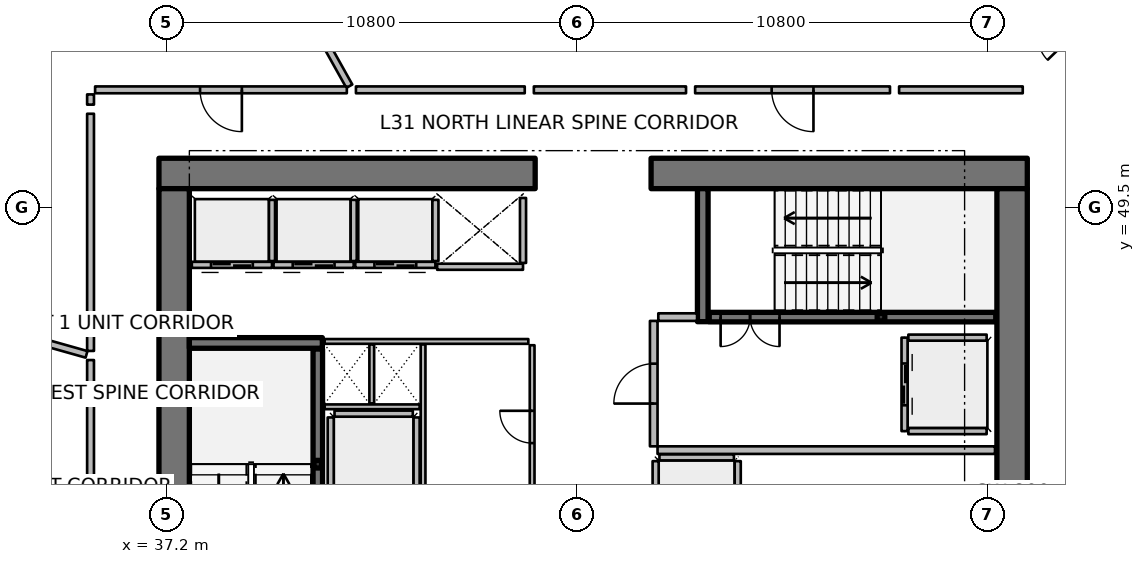
"""IFC4 building model, lengths in metres.
Left out: names, types, materials, properties, quantities, classifications, styles, units other than length and angle.
Written with IfcOpenShell. Run it as: python <this file> out.ifc"""

import sys

from ifc_helpers import new_model, si_unit, direction, frame, frame_2d, origin, origin_2d, place, context, subcontext, project, spatial, rectangle, hollow_rectangle, extrude, element, fill, save


model = new_model("IFC4")
c1 = context("Model", 3, precision=1e-05, world=origin(), true_north=direction((0.0, 1.0)))
c2 = subcontext(c1, "Body", "Model", "MODEL_VIEW")
j1 = project(units=[si_unit("LENGTHUNIT", "METRE"), si_unit("PLANEANGLEUNIT", "RADIAN")], contexts=[c1])
p1 = place(None, origin())
s1 = spatial("IfcSite", under=j1, at=p1, CompositionType="ELEMENT")
p2 = place(p1, origin())
s2 = spatial("IfcBuilding", under=s1, at=p2, CompositionType="ELEMENT")
p3 = place(p2, frame((0.0, 0.0, 127.8)))
s3 = spatial("IfcBuildingStorey", under=s2, at=p3, CompositionType="ELEMENT", Elevation=127.8)
p4 = place(p3, frame((37.0, 50.4, 0.0), z_axis=(0.0, 0.0, 1.0), x_axis=(1.0, 0.0, 0.0)))
e1 = element("IfcWall", 1, at=p4, inside=s3, PredefinedType="SHEAR", context=c2, shape_type="SweptSolid", body=[
    extrude(rectangle(XDim=9.9, YDim=0.8, at=frame_2d((4.95, 0.0))), origin(), (0.0, 0.0, 1.0), 3.75),
])
p5 = place(p3, frame((49.95, 50.4, 0.0), z_axis=(0.0, 0.0, 1.0), x_axis=(1.0, 0.0, 0.0)))
e2 = element("IfcWall", 2, at=p5, inside=s3, PredefinedType="SHEAR", context=c2, shape_type="SweptSolid", body=[
    extrude(rectangle(XDim=9.9, YDim=0.8, at=frame_2d((4.95, 0.0))), origin(), (0.0, 0.0, 1.0), 3.75),
])
for number, where, z_axis, x_axis in (
    (3, (37.4, 34.0, 0.0), (0.0, 0.0, 1.0), (0.0, 1.0, 0.0)),
    (4, (59.45, 34.0, 0.0), (0.0, 0.0, 1.0), (0.0, 1.0, 0.0)),
):
    element("IfcWall", number, at=place(p3, frame(where, z_axis=z_axis, x_axis=x_axis)), inside=s3, PredefinedType="SHEAR", context=c2, shape_type="SweptSolid", body=[
        extrude(rectangle(XDim=16.0, YDim=0.8, at=frame_2d((8.0, 0.0))), origin(), (0.0, 0.0, 1.0), 3.75),
    ])
for number, where, z_axis, x_axis in (
    (5, (37.8, 45.94, 0.0), (0.0, 0.0, 1.0), (1.0, 0.0, 0.0)),
    (6, (51.31, 46.5, 0.0), (0.0, 0.0, 1.0), (0.0, 1.0, 0.0)),
):
    element("IfcWall", number, at=place(p3, frame(where, z_axis=z_axis, x_axis=x_axis)), inside=s3, PredefinedType="SHEAR", context=c2, shape_type="SweptSolid", body=[
        extrude(rectangle(XDim=3.5, YDim=0.28, at=frame_2d((1.75, 0.0))), origin(), (0.0, 0.0, 1.0), 3.75),
    ])
for number, where, z_axis, x_axis in (
    (7, (41.18, 42.75, 0.0), (0.0, 0.0, 1.0), (1.0, 0.0, 0.0)),
    (8, (56.0, 46.62, 0.0), (0.0, 0.0, 1.0), (1.0, 0.0, 0.0)),
):
    element("IfcColumn", number, at=place(p3, frame(where, z_axis=z_axis, x_axis=x_axis)), inside=s3, PredefinedType="COLUMN", context=c2, shape_type="SweptSolid", body=[
        extrude(hollow_rectangle(XDim=0.2, YDim=0.2, WallThickness=0.01, InnerFilletRadius=0.01, OuterFilletRadius=0.02, at=origin_2d()), origin(), (0.0, 0.0, 1.0), 1.67),
    ])
p6 = place(p3, frame((41.18, 38.22, 0.0), z_axis=(0.0, 0.0, 1.0), x_axis=(0.0, 1.0, 0.0)))
e9 = element("IfcWall", 9, at=p6, inside=s3, PredefinedType="SOLIDWALL", context=c2, shape_type="SweptSolid", body=[
    extrude(rectangle(XDim=7.56, YDim=0.25, at=frame_2d((3.78, 0.0))), origin(), (0.0, 0.0, 1.0), 3.5),
])
p7 = place(p6, frame((0.3, 0.0, 0.0)))
e10 = element("IfcOpeningElement", 10, at=p7, cuts=e9, PredefinedType="OPENING", context=c2, shape_type="SweptSolid", body=[
    extrude(rectangle(XDim=1.55, YDim=2.15, at=frame_2d((0.775, 1.075))), frame((0.0, 0.135, 0.0), z_axis=(0.0, -1.0, 0.0), x_axis=(1.0, 0.0, 0.0)), (0.0, 0.0, 1.0), 0.27),
])
p8 = place(p3, frame((51.48, 46.62, 0.0), z_axis=(0.0, 0.0, 1.0), x_axis=(1.0, 0.0, 0.0)))
e11 = element("IfcWall", 11, at=p8, inside=s3, PredefinedType="SOLIDWALL", context=c2, shape_type="SweptSolid", body=[
    extrude(rectangle(XDim=7.54, YDim=0.25, at=frame_2d((3.77, 0.0))), origin(), (0.0, 0.0, 1.0), 3.5),
])
p9 = place(p8, frame((0.3, 0.0, 0.0)))
e12 = element("IfcOpeningElement", 12, at=p9, cuts=e11, PredefinedType="OPENING", context=c2, shape_type="SweptSolid", body=[
    extrude(rectangle(XDim=1.55, YDim=2.15, at=frame_2d((0.775, 1.075))), frame((0.0, 0.135, 0.0), z_axis=(0.0, -1.0, 0.0), x_axis=(1.0, 0.0, 0.0)), (0.0, 0.0, 1.0), 0.27),
])
p10 = place(p3, frame((39.975, 47.995, 0.0), z_axis=(0.0, 0.0, 1.0), x_axis=(-1.0, 0.0, 0.0)))
e13 = element("IfcWall", 13, at=p10, inside=s3, PredefinedType="PARTITIONING", context=c2, shape_type="SweptSolid", body=[
    extrude(rectangle(XDim=2.11, YDim=0.16, at=frame_2d((1.055, 0.0))), origin(), (0.0, 0.0, 1.0), 3.5),
])
p11 = place(p10, frame((0.505, 0.0, 0.0)))
e14 = element("IfcOpeningElement", 14, at=p11, cuts=e13, PredefinedType="OPENING", context=c2, shape_type="SweptSolid", body=[
    extrude(rectangle(XDim=1.1, YDim=2.1, at=frame_2d((0.55, 1.05))), frame((0.0, 0.09, 0.0), z_axis=(0.0, -1.0, 0.0), x_axis=(1.0, 0.0, 0.0)), (0.0, 0.0, 1.0), 0.18),
])
p12 = place(p3, frame((39.975, 48.095, 0.0), z_axis=(0.0, 0.0, 1.0), x_axis=(0.0, 1.0, 0.0)))
e15 = element("IfcWall", 15, at=p12, inside=s3, PredefinedType="PARTITIONING", context=c2, shape_type="SweptSolid", body=[
    extrude(rectangle(XDim=1.61, YDim=0.16, at=frame_2d((0.805, 0.0))), origin(), (0.0, 0.0, 1.0), 3.5),
])
p13 = place(p3, frame((42.125, 47.995, 0.0), z_axis=(0.0, 0.0, 1.0), x_axis=(-1.0, 0.0, 0.0)))
e16 = element("IfcWall", 16, at=p13, inside=s3, PredefinedType="PARTITIONING", context=c2, shape_type="SweptSolid", body=[
    extrude(rectangle(XDim=2.11, YDim=0.16, at=frame_2d((1.055, 0.0))), origin(), (0.0, 0.0, 1.0), 3.5),
])
p14 = place(p13, frame((0.505, 0.0, 0.0)))
e17 = element("IfcOpeningElement", 17, at=p14, cuts=e16, PredefinedType="OPENING", context=c2, shape_type="SweptSolid", body=[
    extrude(rectangle(XDim=1.1, YDim=2.1, at=frame_2d((0.55, 1.05))), frame((0.0, 0.09, 0.0), z_axis=(0.0, -1.0, 0.0), x_axis=(1.0, 0.0, 0.0)), (0.0, 0.0, 1.0), 0.18),
])
p15 = place(p3, frame((42.125, 48.095, 0.0), z_axis=(0.0, 0.0, 1.0), x_axis=(0.0, 1.0, 0.0)))
e18 = element("IfcWall", 18, at=p15, inside=s3, PredefinedType="PARTITIONING", context=c2, shape_type="SweptSolid", body=[
    extrude(rectangle(XDim=1.61, YDim=0.16, at=frame_2d((0.805, 0.0))), origin(), (0.0, 0.0, 1.0), 3.5),
])
p16 = place(p3, frame((44.275, 47.995, 0.0), z_axis=(0.0, 0.0, 1.0), x_axis=(-1.0, 0.0, 0.0)))
e19 = element("IfcWall", 19, at=p16, inside=s3, PredefinedType="PARTITIONING", context=c2, shape_type="SweptSolid", body=[
    extrude(rectangle(XDim=2.11, YDim=0.16, at=frame_2d((1.055, 0.0))), origin(), (0.0, 0.0, 1.0), 3.5),
])
p17 = place(p16, frame((0.505, 0.0, 0.0)))
e20 = element("IfcOpeningElement", 20, at=p17, cuts=e19, PredefinedType="OPENING", context=c2, shape_type="SweptSolid", body=[
    extrude(rectangle(XDim=1.1, YDim=2.1, at=frame_2d((0.55, 1.05))), frame((0.0, 0.09, 0.0), z_axis=(0.0, -1.0, 0.0), x_axis=(1.0, 0.0, 0.0)), (0.0, 0.0, 1.0), 0.18),
])
p18 = place(p3, frame((44.275, 48.095, 0.0), z_axis=(0.0, 0.0, 1.0), x_axis=(0.0, 1.0, 0.0)))
e21 = element("IfcWall", 21, at=p18, inside=s3, PredefinedType="PARTITIONING", context=c2, shape_type="SweptSolid", body=[
    extrude(rectangle(XDim=1.61, YDim=0.16, at=frame_2d((0.805, 0.0))), origin(), (0.0, 0.0, 1.0), 3.5),
])
p19 = place(p3, frame((46.58, 47.945, 0.0), z_axis=(0.0, 0.0, 1.0), x_axis=(-1.0, 0.0, 0.0)))
e22 = element("IfcWall", 22, at=p19, inside=s3, PredefinedType="PARTITIONING", context=c2, shape_type="SweptSolid", body=[
    extrude(rectangle(XDim=2.26, YDim=0.16, at=frame_2d((1.13, 0.0))), origin(), (0.0, 0.0, 1.0), 3.5),
])
p20 = place(p3, frame((46.58, 48.045, 0.0), z_axis=(0.0, 0.0, 1.0), x_axis=(0.0, 1.0, 0.0)))
e23 = element("IfcWall", 23, at=p20, inside=s3, PredefinedType="PARTITIONING", context=c2, shape_type="SweptSolid", body=[
    extrude(rectangle(XDim=1.71, YDim=0.16, at=frame_2d((0.855, 0.0))), origin(), (0.0, 0.0, 1.0), 3.5),
])
for number, where, z_axis, x_axis in (
    (24, (43.78, 41.72, 0.0), (0.0, 0.0, 1.0), (0.0, 1.0, 0.0)),
    (25, (41.52, 41.72, 0.0), (0.0, 0.0, 1.0), (0.0, 1.0, 0.0)),
):
    element("IfcWall", number, at=place(p3, frame(where, z_axis=z_axis, x_axis=x_axis)), inside=s3, PredefinedType="PARTITIONING", context=c2, shape_type="SweptSolid", body=[
        extrude(rectangle(XDim=2.26, YDim=0.16, at=frame_2d((1.13, 0.0))), origin(), (0.0, 0.0, 1.0), 3.5),
    ])
p21 = place(p3, frame((41.62, 44.08, 0.0), z_axis=(0.0, 0.0, 1.0), x_axis=(1.0, 0.0, 0.0)))
e26 = element("IfcWall", 26, at=p21, inside=s3, PredefinedType="PARTITIONING", context=c2, shape_type="SweptSolid", body=[
    extrude(rectangle(XDim=2.06, YDim=0.16, at=frame_2d((1.03, 0.0))), origin(), (0.0, 0.0, 1.0), 3.5),
])
p22 = place(p3, frame((56.62, 46.08, 0.0), z_axis=(0.0, 0.0, 1.0), x_axis=(0.0, -1.0, 0.0)))
e27 = element("IfcWall", 27, at=p22, inside=s3, PredefinedType="PARTITIONING", context=c2, shape_type="SweptSolid", body=[
    extrude(rectangle(XDim=2.46, YDim=0.16, at=frame_2d((1.23, 0.0))), origin(), (0.0, 0.0, 1.0), 3.5),
])
p23 = place(p22, frame((0.68, 0.0, 0.0)))
e28 = element("IfcOpeningElement", 28, at=p23, cuts=e27, PredefinedType="OPENING", context=c2, shape_type="SweptSolid", body=[
    extrude(rectangle(XDim=1.1, YDim=2.1, at=frame_2d((0.55, 1.05))), frame((0.0, 0.09, 0.0), z_axis=(0.0, -1.0, 0.0), x_axis=(1.0, 0.0, 0.0)), (0.0, 0.0, 1.0), 0.18),
])
for number, where, z_axis, x_axis in (
    (29, (56.72, 46.08, 0.0), (0.0, 0.0, 1.0), (1.0, 0.0, 0.0)),
    (30, (56.72, 43.62, 0.0), (0.0, 0.0, 1.0), (1.0, 0.0, 0.0)),
):
    element("IfcWall", number, at=place(p3, frame(where, z_axis=z_axis, x_axis=x_axis)), inside=s3, PredefinedType="PARTITIONING", context=c2, shape_type="SweptSolid", body=[
        extrude(rectangle(XDim=2.06, YDim=0.16, at=frame_2d((1.03, 0.0))), origin(), (0.0, 0.0, 1.0), 3.5),
    ])
for number, where, z_axis, x_axis in (
    (31, (52.23, 40.67, 0.0), (0.0, 0.0, 1.0), (0.0, 1.0, 0.0)),
    (32, (50.07, 40.67, 0.0), (0.0, 0.0, 1.0), (0.0, 1.0, 0.0)),
):
    element("IfcWall", number, at=place(p3, frame(where, z_axis=z_axis, x_axis=x_axis)), inside=s3, PredefinedType="PARTITIONING", context=c2, shape_type="SweptSolid", body=[
        extrude(rectangle(XDim=2.16, YDim=0.16, at=frame_2d((1.08, 0.0))), origin(), (0.0, 0.0, 1.0), 3.5),
    ])
p24 = place(p3, frame((50.17, 42.93, 0.0), z_axis=(0.0, 0.0, 1.0), x_axis=(1.0, 0.0, 0.0)))
e33 = element("IfcWall", 33, at=p24, inside=s3, PredefinedType="PARTITIONING", context=c2, shape_type="SweptSolid", body=[
    extrude(rectangle(XDim=1.96, YDim=0.16, at=frame_2d((0.98, 0.0))), origin(), (0.0, 0.0, 1.0), 3.5),
])
p25 = place(p3, frame((50.12, 43.12, 0.0), z_axis=(0.0, 0.0, 1.0), x_axis=(1.0, 0.0, 0.0)))
e34 = element("IfcWall", 34, at=p25, inside=s3, PredefinedType="PARTITIONING", context=c2, shape_type="SweptSolid", body=[
    extrude(rectangle(XDim=8.88, YDim=0.2, at=frame_2d((4.44, 0.0))), origin(), (0.0, 0.0, 1.0), 3.5),
])
p26 = place(p3, frame((50.14, 46.62, 0.0), z_axis=(0.0, 0.0, 1.0), x_axis=(1.0, 0.0, 0.0)))
e35 = element("IfcWall", 35, at=p26, inside=s3, PredefinedType="PARTITIONING", context=c2, shape_type="SweptSolid", body=[
    extrude(rectangle(XDim=1.02, YDim=0.2, at=frame_2d((0.51, 0.0))), origin(), (0.0, 0.0, 1.0), 3.5),
])
p27 = place(p3, frame((50.02, 43.22, 0.0), z_axis=(0.0, 0.0, 1.0), x_axis=(0.0, 1.0, 0.0)))
e36 = element("IfcWall", 36, at=p27, inside=s3, PredefinedType="PARTITIONING", context=c2, shape_type="SweptSolid", body=[
    extrude(rectangle(XDim=3.3, YDim=0.2, at=frame_2d((1.65, 0.0))), origin(), (0.0, 0.0, 1.0), 3.5),
])
p28 = place(p27, frame((1.125, 0.0, 0.0)))
e37 = element("IfcOpeningElement", 37, at=p28, cuts=e36, PredefinedType="OPENING", context=c2, shape_type="SweptSolid", body=[
    extrude(rectangle(XDim=1.05, YDim=2.1, at=frame_2d((0.525, 1.05))), frame((0.0, 0.11, 0.0), z_axis=(0.0, -1.0, 0.0), x_axis=(1.0, 0.0, 0.0)), (0.0, 0.0, 1.0), 0.22),
])
p29 = place(p3, frame((41.36, 45.98, 0.0), z_axis=(0.0, 0.0, 1.0), x_axis=(1.0, 0.0, 0.0)))
e38 = element("IfcWall", 38, at=p29, inside=s3, PredefinedType="PARTITIONING", context=c2, shape_type="SweptSolid", body=[
    extrude(rectangle(XDim=5.36, YDim=0.125, at=frame_2d((2.68, 0.0))), origin(), (0.0, 0.0, 1.0), 2.94),
])
p30 = place(p3, frame((41.36, 44.26, 0.0), z_axis=(0.0, 0.0, 1.0), x_axis=(1.0, 0.0, 0.0)))
e39 = element("IfcWall", 39, at=p30, inside=s3, PredefinedType="PARTITIONING", context=c2, shape_type="SweptSolid", body=[
    extrude(rectangle(XDim=2.5, YDim=0.125, at=frame_2d((1.25, 0.0))), origin(), (0.0, 0.0, 1.0), 2.94),
])
p31 = place(p3, frame((42.6, 44.35, 0.0), z_axis=(0.0, 0.0, 1.0), x_axis=(0.0, 1.0, 0.0)))
e40 = element("IfcWall", 40, at=p31, inside=s3, PredefinedType="PARTITIONING", context=c2, shape_type="SweptSolid", body=[
    extrude(rectangle(XDim=1.55, YDim=0.125, at=frame_2d((0.775, 0.0))), origin(), (0.0, 0.0, 1.0), 2.94),
])
p32 = place(p3, frame((43.95, 41.58, 0.0), z_axis=(0.0, 0.0, 1.0), x_axis=(0.0, 1.0, 0.0)))
e41 = element("IfcWall", 41, at=p32, inside=s3, PredefinedType="PARTITIONING", context=c2, shape_type="SweptSolid", body=[
    extrude(rectangle(XDim=4.32, YDim=0.125, at=frame_2d((2.16, 0.0))), origin(), (0.0, 0.0, 1.0), 2.94),
])
p33 = place(p3, frame((46.82, 41.58, 0.0), z_axis=(0.0, 0.0, 1.0), x_axis=(0.0, 1.0, 0.0)))
e42 = element("IfcWall", 42, at=p33, inside=s3, PredefinedType="PARTITIONING", context=c2, shape_type="SweptSolid", body=[
    extrude(rectangle(XDim=4.3, YDim=0.125, at=frame_2d((2.15, 0.0))), origin(), (0.0, 0.0, 1.0), 2.94),
])
p34 = place(p33, frame((1.725, 0.0, 0.0)))
e43 = element("IfcOpeningElement", 43, at=p34, cuts=e42, PredefinedType="OPENING", context=c2, shape_type="SweptSolid", body=[
    extrude(rectangle(XDim=0.85, YDim=2.06, at=frame_2d((0.425, 1.03))), frame((0.0, 0.073, 0.0), z_axis=(0.0, -1.0, 0.0), x_axis=(1.0, 0.0, 0.0)), (0.0, 0.0, 1.0), 0.145),
])
p35 = place(p3, frame((42.01, 52.696, 0.0), z_axis=(0.0, 0.0, 1.0), x_axis=(-0.488637104979, 0.872487122906, 0.0)))
e44 = element("IfcWall", 44, at=p35, inside=s3, PredefinedType="PARTITIONING", context=c2, shape_type="SweptSolid", body=[
    extrude(rectangle(XDim=9.476, YDim=0.18, at=frame_2d((4.738, 0.0))), origin(), (0.0, 0.0, 1.0), 2.94),
])
p36 = place(p3, frame((35.094, 45.64, 0.0), z_axis=(0.0, 0.0, 1.0), x_axis=(-0.962457696796, 0.271431725996, 0.0)))
e45 = element("IfcWall", 45, at=p36, inside=s3, PredefinedType="PARTITIONING", context=c2, shape_type="SweptSolid", body=[
    extrude(rectangle(XDim=12.642, YDim=0.18, at=frame_2d((6.321, 0.0))), origin(), (0.0, 0.0, 1.0), 2.94),
])
p37 = place(p3, frame((41.944, 52.6, 0.0), z_axis=(0.0, 0.0, 1.0), x_axis=(-1.0, 0.0, 0.0)))
e46 = element("IfcWall", 46, at=p37, inside=s3, PredefinedType="PARTITIONING", context=c2, shape_type="SweptSolid", body=[
    extrude(rectangle(XDim=6.624, YDim=0.18, at=frame_2d((3.312, 0.0))), origin(), (0.0, 0.0, 1.0), 2.94),
])
p38 = place(p37, frame((2.762, 0.0, 0.0)))
e47 = element("IfcOpeningElement", 47, at=p38, cuts=e46, PredefinedType="OPENING", context=c2, shape_type="SweptSolid", body=[
    extrude(rectangle(XDim=1.1, YDim=2.1, at=frame_2d((0.55, 1.05))), frame((0.0, 0.1, 0.0), z_axis=(0.0, -1.0, 0.0), x_axis=(1.0, 0.0, 0.0)), (0.0, 0.0, 1.0), 0.2),
])
p39 = place(p3, frame((35.2, 52.48, 0.0), z_axis=(0.0, 0.0, 1.0), x_axis=(0.0, -1.0, 0.0)))
e48 = element("IfcWall", 48, at=p39, inside=s3, PredefinedType="PARTITIONING", context=c2, shape_type="SweptSolid", body=[
    extrude(rectangle(XDim=0.269, YDim=0.18, at=frame_2d((0.135, 0.0))), origin(), (0.0, 0.0, 1.0), 2.94),
])
p40 = place(p3, frame((35.2, 51.971, 0.0), z_axis=(0.0, 0.0, 1.0), x_axis=(0.0, -1.0, 0.0)))
e49 = element("IfcWall", 49, at=p40, inside=s3, PredefinedType="PARTITIONING", context=c2, shape_type="SweptSolid", body=[
    extrude(rectangle(XDim=6.241, YDim=0.18, at=frame_2d((3.12, 0.0))), origin(), (0.0, 0.0, 1.0), 2.94),
])
p41 = place(p3, frame((35.2, 45.49, 0.0), z_axis=(0.0, 0.0, 1.0), x_axis=(0.0, -1.0, 0.0)))
e50 = element("IfcWall", 50, at=p41, inside=s3, PredefinedType="PARTITIONING", context=c2, shape_type="SweptSolid", body=[
    extrude(rectangle(XDim=4.885, YDim=0.18, at=frame_2d((2.442, 0.0))), origin(), (0.0, 0.0, 1.0), 2.94),
])
p42 = place(p3, frame((56.236, 52.6, 0.0), z_axis=(0.0, 0.0, 1.0), x_axis=(-1.0, 0.0, 0.0)))
e51 = element("IfcWall", 51, at=p42, inside=s3, PredefinedType="PARTITIONING", context=c2, shape_type="SweptSolid", body=[
    extrude(rectangle(XDim=5.127, YDim=0.18, at=frame_2d((2.563, 0.0))), origin(), (0.0, 0.0, 1.0), 2.94),
])
p43 = place(p42, frame((2.013, 0.0, 0.0)))
e52 = element("IfcOpeningElement", 52, at=p43, cuts=e51, PredefinedType="OPENING", context=c2, shape_type="SweptSolid", body=[
    extrude(rectangle(XDim=1.1, YDim=2.1, at=frame_2d((0.55, 1.05))), frame((0.0, 0.1, 0.0), z_axis=(0.0, -1.0, 0.0), x_axis=(1.0, 0.0, 0.0)), (0.0, 0.0, 1.0), 0.2),
])
p44 = place(p3, frame((59.73, 52.6, 0.0), z_axis=(0.0, 0.0, 1.0), x_axis=(-1.0, 0.0, 0.0)))
e53 = element("IfcWall", 53, at=p44, inside=s3, PredefinedType="PARTITIONING", context=c2, shape_type="SweptSolid", body=[
    extrude(rectangle(XDim=3.254, YDim=0.18, at=frame_2d((1.627, 0.0))), origin(), (0.0, 0.0, 1.0), 2.94),
])
p45 = place(p3, frame((62.293, 52.708, 0.0), z_axis=(0.0, 0.0, 1.0), x_axis=(-0.696779354898, 0.717285529331, 0.0)))
e54 = element("IfcWall", 54, at=p45, inside=s3, PredefinedType="PARTITIONING", context=c2, shape_type="SweptSolid", body=[
    extrude(rectangle(XDim=4.536, YDim=0.125, at=frame_2d((2.268, 0.0))), origin(), (0.0, 0.0, 1.0), 2.94),
])
p46 = place(p45, frame((1.818, 0.0, 0.0)))
e55 = element("IfcOpeningElement", 55, at=p46, cuts=e54, PredefinedType="OPENING", context=c2, shape_type="SweptSolid", body=[
    extrude(rectangle(XDim=0.9, YDim=2.08, at=frame_2d((0.45, 1.04))), frame((0.0, 0.073, 0.0), z_axis=(0.0, -1.0, 0.0), x_axis=(1.0, 0.0, 0.0)), (0.0, 0.0, 1.0), 0.145),
])
p47 = place(p3, frame((50.869, 52.6, 0.0), z_axis=(0.0, 0.0, 1.0), x_axis=(-1.0, 0.0, 0.0)))
e56 = element("IfcWall", 56, at=p47, inside=s3, PredefinedType="PARTITIONING", context=c2, shape_type="SweptSolid", body=[
    extrude(rectangle(XDim=4.004, YDim=0.18, at=frame_2d((2.002, 0.0))), origin(), (0.0, 0.0, 1.0), 2.94),
])
p48 = place(p3, frame((46.625, 52.6, 0.0), z_axis=(0.0, 0.0, 1.0), x_axis=(-1.0, 0.0, 0.0)))
e57 = element("IfcWall", 57, at=p48, inside=s3, PredefinedType="PARTITIONING", context=c2, shape_type="SweptSolid", body=[
    extrude(rectangle(XDim=4.442, YDim=0.18, at=frame_2d((2.221, 0.0))), origin(), (0.0, 0.0, 1.0), 2.94),
])
p49 = place(p9, origin())
e58 = element("IfcDoor", 58, at=p49, inside=s3, OperationType="DOUBLE_DOOR_SINGLE_SWING", PredefinedType="DOOR", context=c2, shape_type="SweptSolid", body=[
    extrude(rectangle(XDim=1.55, YDim=2.15, at=frame_2d((0.775, 1.075))), frame((0.0, 0.025, 0.0), z_axis=(0.0, -1.0, 0.0), x_axis=(1.0, 0.0, 0.0)), (0.0, 0.0, 1.0), 0.05),
])
fill(e12, e58)
p50 = place(p11, origin())
e59 = element("IfcDoor", 59, at=p50, inside=s3, OperationType="DOUBLE_DOOR_SLIDING", PredefinedType="DOOR", context=c2, shape_type="SweptSolid", body=[
    extrude(rectangle(XDim=1.1, YDim=2.1, at=frame_2d((0.55, 1.05))), frame((0.0, 0.025, 0.0), z_axis=(0.0, -1.0, 0.0), x_axis=(1.0, 0.0, 0.0)), (0.0, 0.0, 1.0), 0.05),
])
fill(e14, e59)
p51 = place(p14, origin())
e60 = element("IfcDoor", 60, at=p51, inside=s3, OperationType="DOUBLE_DOOR_SLIDING", PredefinedType="DOOR", context=c2, shape_type="SweptSolid", body=[
    extrude(rectangle(XDim=1.1, YDim=2.1, at=frame_2d((0.55, 1.05))), frame((0.0, 0.025, 0.0), z_axis=(0.0, -1.0, 0.0), x_axis=(1.0, 0.0, 0.0)), (0.0, 0.0, 1.0), 0.05),
])
fill(e17, e60)
p52 = place(p17, origin())
e61 = element("IfcDoor", 61, at=p52, inside=s3, OperationType="DOUBLE_DOOR_SLIDING", PredefinedType="DOOR", context=c2, shape_type="SweptSolid", body=[
    extrude(rectangle(XDim=1.1, YDim=2.1, at=frame_2d((0.55, 1.05))), frame((0.0, 0.025, 0.0), z_axis=(0.0, -1.0, 0.0), x_axis=(1.0, 0.0, 0.0)), (0.0, 0.0, 1.0), 0.05),
])
fill(e20, e61)
p53 = place(p23, origin())
e62 = element("IfcDoor", 62, at=p53, inside=s3, OperationType="DOUBLE_DOOR_SLIDING", PredefinedType="DOOR", context=c2, shape_type="SweptSolid", body=[
    extrude(rectangle(XDim=1.1, YDim=2.1, at=frame_2d((0.55, 1.05))), frame((0.0, 0.025, 0.0), z_axis=(0.0, -1.0, 0.0), x_axis=(1.0, 0.0, 0.0)), (0.0, 0.0, 1.0), 0.05),
])
fill(e28, e62)
p54 = place(p28, origin())
e63 = element("IfcDoor", 63, at=p54, inside=s3, OperationType="SINGLE_SWING_LEFT", PredefinedType="DOOR", context=c2, shape_type="SweptSolid", body=[
    extrude(rectangle(XDim=1.05, YDim=2.1, at=frame_2d((0.525, 1.05))), frame((0.0, 0.025, 0.0), z_axis=(0.0, -1.0, 0.0), x_axis=(1.0, 0.0, 0.0)), (0.0, 0.0, 1.0), 0.05),
])
fill(e37, e63)
p55 = place(p34, origin())
e64 = element("IfcDoor", 64, at=p55, inside=s3, OperationType="SINGLE_SWING_RIGHT", PredefinedType="DOOR", context=c2, shape_type="SweptSolid", body=[
    extrude(rectangle(XDim=0.85, YDim=2.06, at=frame_2d((0.425, 1.03))), frame((0.0, 0.025, 0.0), z_axis=(0.0, -1.0, 0.0), x_axis=(1.0, 0.0, 0.0)), (0.0, 0.0, 1.0), 0.05),
])
fill(e43, e64)
p56 = place(p38, origin())
e65 = element("IfcDoor", 65, at=p56, inside=s3, OperationType="SINGLE_SWING_LEFT", PredefinedType="DOOR", context=c2, shape_type="SweptSolid", body=[
    extrude(rectangle(XDim=1.1, YDim=2.1, at=frame_2d((0.55, 1.05))), frame((0.0, 0.025, 0.0), z_axis=(0.0, -1.0, 0.0), x_axis=(1.0, 0.0, 0.0)), (0.0, 0.0, 1.0), 0.05),
])
fill(e47, e65)
p57 = place(p43, origin())
e66 = element("IfcDoor", 66, at=p57, inside=s3, OperationType="SINGLE_SWING_LEFT", PredefinedType="DOOR", context=c2, shape_type="SweptSolid", body=[
    extrude(rectangle(XDim=1.1, YDim=2.1, at=frame_2d((0.55, 1.05))), frame((0.0, 0.025, 0.0), z_axis=(0.0, -1.0, 0.0), x_axis=(1.0, 0.0, 0.0)), (0.0, 0.0, 1.0), 0.05),
])
fill(e52, e66)
save(model, sys.argv[1])
